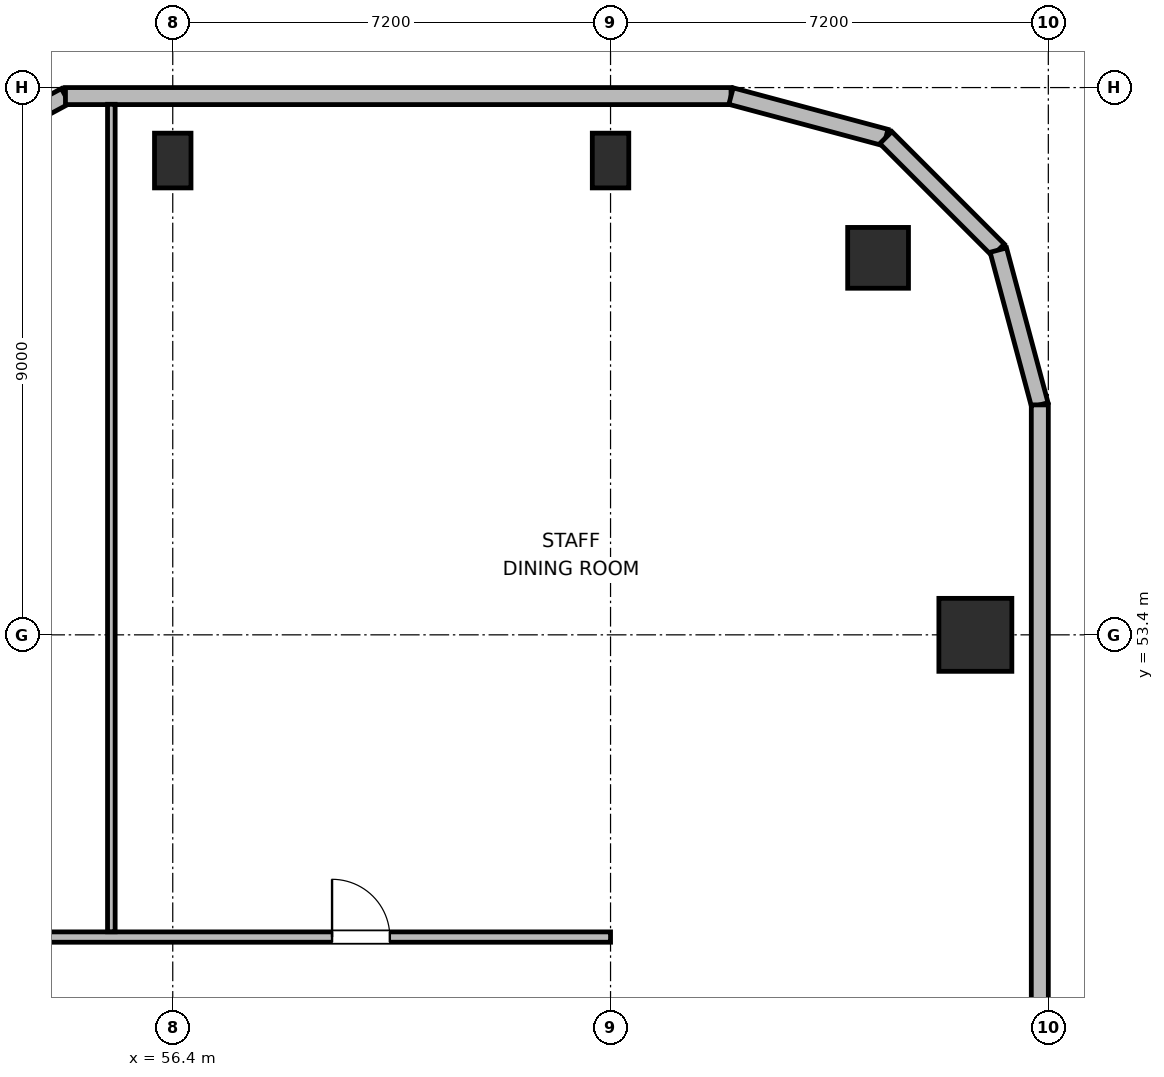
"""IFC4 building model, lengths in metres.
Left out: names, types, materials, properties, quantities, classifications, styles, units other than length and angle.
Written with IfcOpenShell. Run it as: python <this file> out.ifc"""

import sys

from ifc_helpers import new_model, si_unit, direction, frame, frame_2d, origin, origin_2d, place, context, subcontext, project, spatial, rectangle, circle, extrude, element, fill, save


model = new_model("IFC4")
c1 = context("Model", 3, precision=1e-05, world=origin(), true_north=direction((0.0, 1.0)))
c2 = subcontext(c1, "Body", "Model", "MODEL_VIEW")
j1 = project(units=[si_unit("LENGTHUNIT", "METRE"), si_unit("PLANEANGLEUNIT", "RADIAN")], contexts=[c1])
p1 = place(None, origin())
s1 = spatial("IfcSite", under=j1, at=p1, CompositionType="ELEMENT")
p2 = place(p1, origin())
s2 = spatial("IfcBuilding", under=s1, at=p2, CompositionType="ELEMENT")
p3 = place(p2, frame((0.0, 0.0, 223.2)))
s3 = spatial("IfcBuildingStorey", under=s2, at=p3, CompositionType="ELEMENT", Elevation=223.2)
p4 = place(p3, frame((68.0, 59.6, 0.0), z_axis=(0.0, 0.0, 1.0), x_axis=(1.0, 0.0, 0.0)))
e1 = element("IfcColumn", 1, at=p4, inside=s3, PredefinedType="COLUMN", context=c2, shape_type="SweptSolid", body=[
    extrude(circle(Radius=0.5, at=origin_2d()), origin(), (0.0, 0.0, 1.0), 3.9),
])
for number, where, z_axis, x_axis in (
    (2, (56.4, 61.2, 0.0), (0.0, 0.0, 1.0), (1.0, 0.0, 0.0)),
    (3, (63.6, 61.2, 0.0), (0.0, 0.0, 1.0), (1.0, 0.0, 0.0)),
):
    element("IfcColumn", number, at=place(p3, frame(where, z_axis=z_axis, x_axis=x_axis)), inside=s3, PredefinedType="COLUMN", context=c2, shape_type="SweptSolid", body=[
        extrude(rectangle(XDim=0.6, YDim=0.9, at=origin_2d()), origin(), (0.0, 0.0, 1.0), 3.9),
    ])
p5 = place(p3, frame((69.6, 53.4, 0.0), z_axis=(0.0, 0.0, 1.0), x_axis=(1.0, 0.0, 0.0)))
e4 = element("IfcColumn", 4, at=p5, inside=s3, PredefinedType="COLUMN", context=c2, shape_type="SweptSolid", body=[
    extrude(rectangle(XDim=1.2, YDim=1.2, at=origin_2d()), origin(), (0.0, 0.0, 1.0), 3.9),
])
p6 = place(p3, frame((53.54, 61.67, 0.0), z_axis=(0.0, 0.0, 1.0), x_axis=(0.880515214249, 0.474017887296, 0.0)))
e5 = element("IfcWall", 5, at=p6, inside=s3, PredefinedType="SOLIDWALL", context=c2, shape_type="SweptSolid", body=[
    extrude(rectangle(XDim=1.244, YDim=0.28, at=frame_2d((0.622, 0.0))), origin(), (0.0, 0.0, 1.0), 3.68),
])
p7 = place(p3, frame((54.635, 62.26, 0.0), z_axis=(0.0, 0.0, 1.0), x_axis=(1.0, 0.0, 0.0)))
e6 = element("IfcWall", 6, at=p7, inside=s3, PredefinedType="SOLIDWALL", context=c2, shape_type="SweptSolid", body=[
    extrude(rectangle(XDim=10.946, YDim=0.28, at=frame_2d((5.473, 0.0))), origin(), (0.0, 0.0, 1.0), 3.68),
])
p8 = place(p3, frame((65.582, 62.26, 0.0), z_axis=(0.0, 0.0, 1.0), x_axis=(0.965883534663, -0.258976828051, 0.0)))
e7 = element("IfcWall", 7, at=p8, inside=s3, PredefinedType="SOLIDWALL", context=c2, shape_type="SweptSolid", body=[
    extrude(rectangle(XDim=2.636, YDim=0.28, at=frame_2d((1.318, 0.0))), origin(), (0.0, 0.0, 1.0), 3.68),
])
p9 = place(p3, frame((68.127, 61.577, 0.0), z_axis=(0.0, 0.0, 1.0), x_axis=(0.707153437963, -0.707060121331, 0.0)))
e8 = element("IfcWall", 8, at=p9, inside=s3, PredefinedType="SOLIDWALL", context=c2, shape_type="SweptSolid", body=[
    extrude(rectangle(XDim=2.616, YDim=0.28, at=frame_2d((1.308, 0.0))), origin(), (0.0, 0.0, 1.0), 3.68),
])
p10 = place(p3, frame((69.978, 59.728, 0.0), z_axis=(0.0, 0.0, 1.0), x_axis=(0.2588904131, -0.965906700466, 0.0)))
e9 = element("IfcWall", 9, at=p10, inside=s3, PredefinedType="SOLIDWALL", context=c2, shape_type="SweptSolid", body=[
    extrude(rectangle(XDim=2.636, YDim=0.28, at=frame_2d((1.318, 0.0))), origin(), (0.0, 0.0, 1.0), 3.68),
])
p11 = place(p3, frame((70.66, 57.182, 0.0), z_axis=(0.0, 0.0, 1.0), x_axis=(0.0, -1.0, 0.0)))
e10 = element("IfcWall", 10, at=p11, inside=s3, PredefinedType="SOLIDWALL", context=c2, shape_type="SweptSolid", body=[
    extrude(rectangle(XDim=14.442, YDim=0.28, at=frame_2d((7.221, 0.0))), origin(), (0.0, 0.0, 1.0), 3.68),
])
p12 = place(p3, frame((28.7, 48.43, 0.0), z_axis=(0.0, 0.0, 1.0), x_axis=(1.0, 0.0, 0.0)))
e11 = element("IfcWall", 11, at=p12, inside=s3, PredefinedType="PARTITIONING", context=c2, shape_type="SweptSolid", body=[
    extrude(rectangle(XDim=34.9, YDim=0.17, at=frame_2d((17.45, 0.0))), origin(), (0.0, 0.0, 1.0), 3.68),
])
p13 = place(p12, frame((4.025, 0.0, 0.0)))
e12 = element("IfcOpeningElement", 12, at=p13, cuts=e11, PredefinedType="OPENING", context=c2, shape_type="SweptSolid", body=[
    extrude(rectangle(XDim=0.95, YDim=2.04, at=frame_2d((0.475, 1.02))), frame((0.0, 0.095, 0.0), z_axis=(0.0, -1.0, 0.0), x_axis=(1.0, 0.0, 0.0)), (0.0, 0.0, 1.0), 0.19),
])
p14 = place(p12, frame((9.96, 0.0, 0.0)))
e13 = element("IfcOpeningElement", 13, at=p14, cuts=e11, PredefinedType="OPENING", context=c2, shape_type="SweptSolid", body=[
    extrude(rectangle(XDim=0.95, YDim=2.04, at=frame_2d((0.475, 1.02))), frame((0.0, 0.095, 0.0), z_axis=(0.0, -1.0, 0.0), x_axis=(1.0, 0.0, 0.0)), (0.0, 0.0, 1.0), 0.19),
])
p15 = place(p12, frame((15.94, 0.0, 0.0)))
e14 = element("IfcOpeningElement", 14, at=p15, cuts=e11, PredefinedType="OPENING", context=c2, shape_type="SweptSolid", body=[
    extrude(rectangle(XDim=0.95, YDim=2.04, at=frame_2d((0.475, 1.02))), frame((0.0, 0.095, 0.0), z_axis=(0.0, -1.0, 0.0), x_axis=(1.0, 0.0, 0.0)), (0.0, 0.0, 1.0), 0.19),
])
p16 = place(p12, frame((23.35, 0.0, 0.0)))
e15 = element("IfcOpeningElement", 15, at=p16, cuts=e11, PredefinedType="OPENING", context=c2, shape_type="SweptSolid", body=[
    extrude(rectangle(XDim=0.95, YDim=2.04, at=frame_2d((0.475, 1.02))), frame((0.0, 0.095, 0.0), z_axis=(0.0, -1.0, 0.0), x_axis=(1.0, 0.0, 0.0)), (0.0, 0.0, 1.0), 0.19),
])
p17 = place(p12, frame((30.32, 0.0, 0.0)))
e16 = element("IfcOpeningElement", 16, at=p17, cuts=e11, PredefinedType="OPENING", context=c2, shape_type="SweptSolid", body=[
    extrude(rectangle(XDim=0.95, YDim=2.04, at=frame_2d((0.475, 1.02))), frame((0.0, 0.095, 0.0), z_axis=(0.0, -1.0, 0.0), x_axis=(1.0, 0.0, 0.0)), (0.0, 0.0, 1.0), 0.19),
])
p18 = place(p3, frame((55.39, 48.517, 0.0), z_axis=(0.0, 0.0, 1.0), x_axis=(0.0, 1.0, 0.0)))
e17 = element("IfcWall", 17, at=p18, inside=s3, PredefinedType="PARTITIONING", context=c2, shape_type="SweptSolid", body=[
    extrude(rectangle(XDim=13.608, YDim=0.125, at=frame_2d((6.804, 0.0))), origin(), (0.0, 0.0, 1.0), 3.043),
])
p19 = place(p17, origin())
e18 = element("IfcDoor", 18, at=p19, inside=s3, OperationType="SINGLE_SWING_LEFT", PredefinedType="DOOR", context=c2, shape_type="SweptSolid", body=[
    extrude(rectangle(XDim=0.95, YDim=2.04, at=frame_2d((0.475, 1.02))), frame((0.0, 0.025, 0.0), z_axis=(0.0, -1.0, 0.0), x_axis=(1.0, 0.0, 0.0)), (0.0, 0.0, 1.0), 0.05),
])
fill(e16, e18)
save(model, sys.argv[1])
